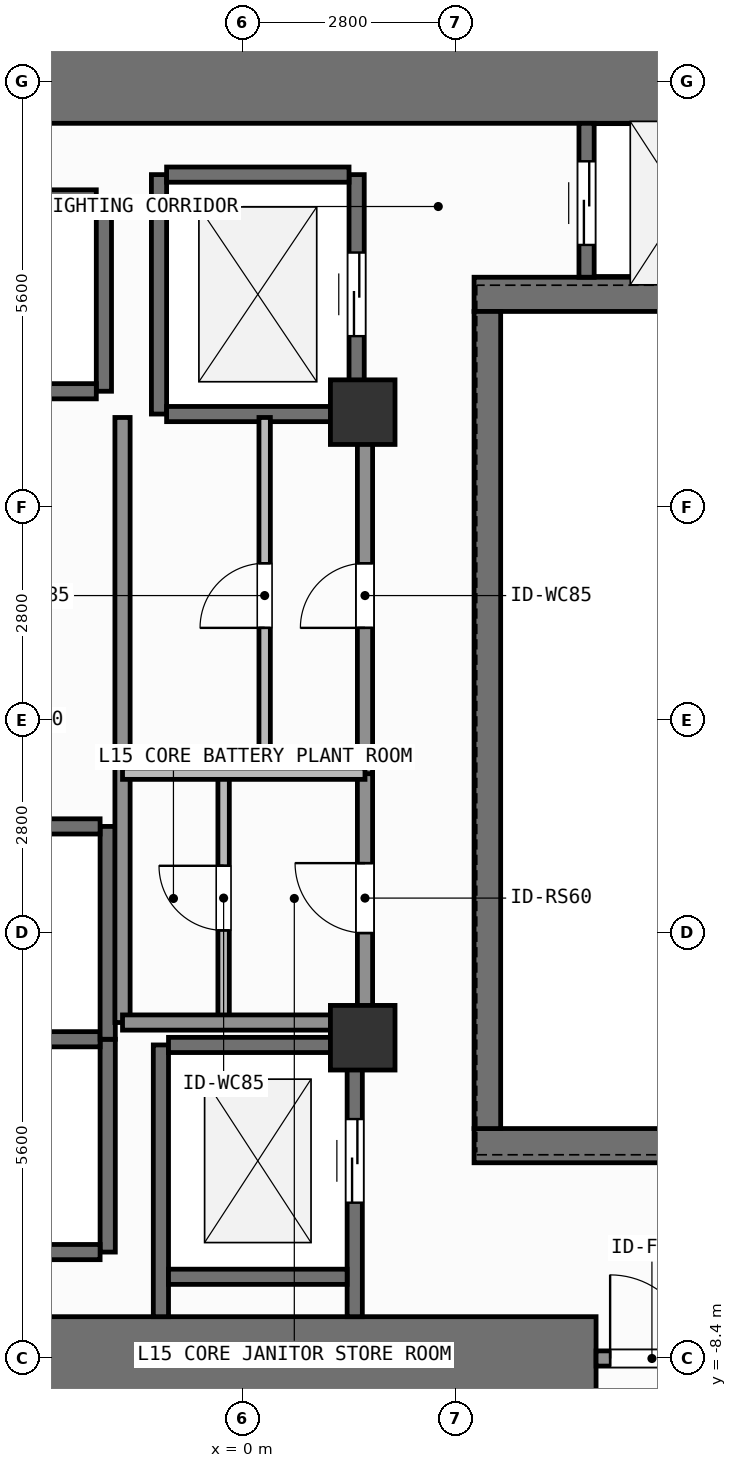
"""IFC4 building model, lengths in metres.
Left out: names, types, materials, properties, quantities, classifications, styles, units other than length and angle.
Written with IfcOpenShell. Run it as: python <this file> out.ifc"""

import sys

from ifc_helpers import new_model, si_unit, direction, frame, frame_2d, origin, origin_2d, place, context, subcontext, project, spatial, rectangle, extrude, element, fill, save


model = new_model("IFC4")
c1 = context("Model", 3, precision=1e-05, world=origin(), true_north=direction((0.0, 1.0)))
c2 = subcontext(c1, "Body", "Model", "MODEL_VIEW")
j1 = project(units=[si_unit("LENGTHUNIT", "METRE"), si_unit("PLANEANGLEUNIT", "RADIAN")], contexts=[c1])
p1 = place(None, origin())
s1 = spatial("IfcSite", under=j1, at=p1, CompositionType="ELEMENT")
p2 = place(p1, origin())
s2 = spatial("IfcBuilding", under=s1, at=p2, CompositionType="ELEMENT")
p3 = place(p2, frame((0.0, 0.0, 57.9)))
s3 = spatial("IfcBuildingStorey", under=s2, at=p3, CompositionType="ELEMENT", Elevation=57.9)
p4 = place(p3, frame((-2.62, -8.4, 0.0), z_axis=(0.0, 0.0, 1.0), x_axis=(1.0, 0.0, 0.0)))
e1 = element("IfcWall", 1, at=p4, inside=s3, PredefinedType="SHEAR", context=c2, shape_type="SweptSolid", body=[
    extrude(rectangle(XDim=7.27, YDim=1.1, at=frame_2d((3.635, 0.0))), origin(), (0.0, 0.0, 1.0), 3.9),
])
p5 = place(p3, frame((-7.55, 8.4, 0.0), z_axis=(0.0, 0.0, 1.0), x_axis=(1.0, 0.0, 0.0)))
e2 = element("IfcWall", 2, at=p5, inside=s3, PredefinedType="SHEAR", context=c2, shape_type="SweptSolid", body=[
    extrude(rectangle(XDim=16.5, YDim=1.1, at=frame_2d((8.25, 0.0))), origin(), (0.0, 0.0, 1.0), 3.9),
])
for number, where, z_axis, x_axis in (
    (3, (3.045, -5.6, 0.0), (0.0, 0.0, 1.0), (1.0, 0.0, 0.0)),
    (4, (3.045, 5.6, 0.0), (0.0, 0.0, 1.0), (1.0, 0.0, 0.0)),
):
    element("IfcWall", number, at=place(p3, frame(where, z_axis=z_axis, x_axis=x_axis)), inside=s3, PredefinedType="SHEAR", context=c2, shape_type="SweptSolid", body=[
        extrude(rectangle(XDim=5.905, YDim=0.45, at=frame_2d((2.953, 0.0))), origin(), (0.0, 0.0, 1.0), 3.9),
    ])
p6 = place(p3, frame((3.22, -5.375, 0.0), z_axis=(0.0, 0.0, 1.0), x_axis=(0.0, 1.0, 0.0)))
e5 = element("IfcWall", 5, at=p6, inside=s3, PredefinedType="SHEAR", context=c2, shape_type="SweptSolid", body=[
    extrude(rectangle(XDim=10.75, YDim=0.35, at=frame_2d((5.375, 0.0))), origin(), (0.0, 0.0, 1.0), 3.9),
])
for number, where, z_axis, x_axis in (
    (6, (1.58, -4.18, 0.0), (0.0, 0.0, 1.0), (1.0, 0.0, 0.0)),
    (7, (1.58, 4.05, 0.0), (0.0, 0.0, 1.0), (1.0, 0.0, 0.0)),
):
    element("IfcColumn", number, at=place(p3, frame(where, z_axis=z_axis, x_axis=x_axis)), inside=s3, PredefinedType="COLUMN", context=c2, shape_type="SweptSolid", body=[
        extrude(rectangle(XDim=0.85, YDim=0.85, at=origin_2d()), origin(), (0.0, 0.0, 1.0), 3.9),
    ])
p7 = place(p3, frame((-1.825, 4.325, 0.0), z_axis=(0.0, 0.0, 1.0), x_axis=(0.0, 1.0, 0.0)))
e8 = element("IfcWall", 8, at=p7, inside=s3, PredefinedType="SHEAR", context=c2, shape_type="SweptSolid", body=[
    extrude(rectangle(XDim=2.55, YDim=0.2, at=frame_2d((1.275, 0.0))), origin(), (0.0, 0.0, 1.0), 3.68),
])
for number, where, z_axis, x_axis in (
    (9, (-4.275, 4.325, 0.0), (0.0, 0.0, 1.0), (1.0, 0.0, 0.0)),
    (10, (-4.275, 6.875, 0.0), (0.0, 0.0, 1.0), (1.0, 0.0, 0.0)),
):
    element("IfcWall", number, at=place(p3, frame(where, z_axis=z_axis, x_axis=x_axis)), inside=s3, PredefinedType="SHEAR", context=c2, shape_type="SweptSolid", body=[
        extrude(rectangle(XDim=2.35, YDim=0.2, at=frame_2d((1.175, 0.0))), origin(), (0.0, 0.0, 1.0), 3.68),
    ])
p8 = place(p3, frame((-1.775, -7.0, 0.0), z_axis=(0.0, 0.0, 1.0), x_axis=(0.0, 1.0, 0.0)))
e11 = element("IfcWall", 11, at=p8, inside=s3, PredefinedType="SHEAR", context=c2, shape_type="SweptSolid", body=[
    extrude(rectangle(XDim=2.8, YDim=0.2, at=frame_2d((1.4, 0.0))), origin(), (0.0, 0.0, 1.0), 3.68),
])
for number, where, z_axis, x_axis in (
    (12, (-4.325, -7.0, 0.0), (0.0, 0.0, 1.0), (1.0, 0.0, 0.0)),
    (13, (-4.325, -4.2, 0.0), (0.0, 0.0, 1.0), (1.0, 0.0, 0.0)),
):
    element("IfcWall", number, at=place(p3, frame(where, z_axis=z_axis, x_axis=x_axis)), inside=s3, PredefinedType="SHEAR", context=c2, shape_type="SweptSolid", body=[
        extrude(rectangle(XDim=2.45, YDim=0.2, at=frame_2d((1.225, 0.0))), origin(), (0.0, 0.0, 1.0), 3.68),
    ])
p9 = place(p3, frame((-1.775, -4.2, 0.0), z_axis=(0.0, 0.0, 1.0), x_axis=(0.0, 1.0, 0.0)))
e14 = element("IfcWall", 14, at=p9, inside=s3, PredefinedType="SHEAR", context=c2, shape_type="SweptSolid", body=[
    extrude(rectangle(XDim=2.8, YDim=0.2, at=frame_2d((1.4, 0.0))), origin(), (0.0, 0.0, 1.0), 3.68),
])
p10 = place(p3, frame((-4.325, -1.4, 0.0), z_axis=(0.0, 0.0, 1.0), x_axis=(1.0, 0.0, 0.0)))
e15 = element("IfcWall", 15, at=p10, inside=s3, PredefinedType="SHEAR", context=c2, shape_type="SweptSolid", body=[
    extrude(rectangle(XDim=2.45, YDim=0.2, at=frame_2d((1.225, 0.0))), origin(), (0.0, 0.0, 1.0), 3.68),
])
p11 = place(p3, frame((-1.1, 4.025, 0.0), z_axis=(0.0, 0.0, 1.0), x_axis=(0.0, 1.0, 0.0)))
e16 = element("IfcWall", 16, at=p11, inside=s3, PredefinedType="SHEAR", context=c2, shape_type="SweptSolid", body=[
    extrude(rectangle(XDim=3.15, YDim=0.2, at=frame_2d((1.575, 0.0))), origin(), (0.0, 0.0, 1.0), 3.68),
])
p12 = place(p3, frame((1.5, 4.025, 0.0), z_axis=(0.0, 0.0, 1.0), x_axis=(0.0, 1.0, 0.0)))
e17 = element("IfcWall", 17, at=p12, inside=s3, PredefinedType="SHEAR", context=c2, shape_type="SweptSolid", body=[
    extrude(rectangle(XDim=3.15, YDim=0.2, at=frame_2d((1.575, 0.0))), origin(), (0.0, 0.0, 1.0), 3.68),
])
p13 = place(p12, frame((1.025, 0.0, 0.0)))
e18 = element("IfcOpeningElement", 18, at=p13, cuts=e17, PredefinedType="OPENING", context=c2, shape_type="SweptSolid", body=[
    extrude(rectangle(XDim=1.1, YDim=2.2, at=frame_2d((0.55, 1.1))), frame((0.0, 0.11, 0.0), z_axis=(0.0, -1.0, 0.0), x_axis=(1.0, 0.0, 0.0)), (0.0, 0.0, 1.0), 0.22),
])
for number, where, z_axis, x_axis in (
    (19, (-1.0, 4.025, 0.0), (0.0, 0.0, 1.0), (1.0, 0.0, 0.0)),
    (20, (-1.0, 7.175, 0.0), (0.0, 0.0, 1.0), (1.0, 0.0, 0.0)),
):
    element("IfcWall", number, at=place(p3, frame(where, z_axis=z_axis, x_axis=x_axis)), inside=s3, PredefinedType="SHEAR", context=c2, shape_type="SweptSolid", body=[
        extrude(rectangle(XDim=2.4, YDim=0.2, at=frame_2d((1.2, 0.0))), origin(), (0.0, 0.0, 1.0), 3.68),
    ])
p14 = place(p3, frame((-1.075, -7.85, 0.0), z_axis=(0.0, 0.0, 1.0), x_axis=(0.0, 1.0, 0.0)))
e21 = element("IfcWall", 21, at=p14, inside=s3, PredefinedType="SHEAR", context=c2, shape_type="SweptSolid", body=[
    extrude(rectangle(XDim=3.575, YDim=0.2, at=frame_2d((1.788, 0.0))), origin(), (0.0, 0.0, 1.0), 3.68),
])
p15 = place(p3, frame((1.475, -7.85, 0.0), z_axis=(0.0, 0.0, 1.0), x_axis=(0.0, 1.0, 0.0)))
e22 = element("IfcWall", 22, at=p15, inside=s3, PredefinedType="SHEAR", context=c2, shape_type="SweptSolid", body=[
    extrude(rectangle(XDim=3.575, YDim=0.2, at=frame_2d((1.788, 0.0))), origin(), (0.0, 0.0, 1.0), 3.68),
])
p16 = place(p15, frame((1.5, 0.0, 0.0)))
e23 = element("IfcOpeningElement", 23, at=p16, cuts=e22, PredefinedType="OPENING", context=c2, shape_type="SweptSolid", body=[
    extrude(rectangle(XDim=1.1, YDim=2.2, at=frame_2d((0.55, 1.1))), frame((0.0, 0.11, 0.0), z_axis=(0.0, -1.0, 0.0), x_axis=(1.0, 0.0, 0.0)), (0.0, 0.0, 1.0), 0.22),
])
for number, where, z_axis, x_axis in (
    (24, (-0.975, -7.325, 0.0), (0.0, 0.0, 1.0), (1.0, 0.0, 0.0)),
    (25, (-0.975, -4.275, 0.0), (0.0, 0.0, 1.0), (1.0, 0.0, 0.0)),
):
    element("IfcWall", number, at=place(p3, frame(where, z_axis=z_axis, x_axis=x_axis)), inside=s3, PredefinedType="SHEAR", context=c2, shape_type="SweptSolid", body=[
        extrude(rectangle(XDim=2.35, YDim=0.2, at=frame_2d((1.175, 0.0))), origin(), (0.0, 0.0, 1.0), 3.68),
    ])
p17 = place(p3, frame((4.525, 5.825, 0.0), z_axis=(0.0, 0.0, 1.0), x_axis=(0.0, 1.0, 0.0)))
e26 = element("IfcWall", 26, at=p17, inside=s3, PredefinedType="SHEAR", context=c2, shape_type="SweptSolid", body=[
    extrude(rectangle(XDim=2.025, YDim=0.2, at=frame_2d((1.013, 0.0))), origin(), (0.0, 0.0, 1.0), 3.68),
])
p18 = place(p17, frame((0.425, 0.0, 0.0)))
e27 = element("IfcOpeningElement", 27, at=p18, cuts=e26, PredefinedType="OPENING", context=c2, shape_type="SweptSolid", body=[
    extrude(rectangle(XDim=1.1, YDim=2.2, at=frame_2d((0.55, 1.1))), frame((0.0, 0.11, 0.0), z_axis=(0.0, -1.0, 0.0), x_axis=(1.0, 0.0, 0.0)), (0.0, 0.0, 1.0), 0.22),
])
p19 = place(p3, frame((4.65, -8.4, 0.0), z_axis=(0.0, 0.0, 1.0), x_axis=(1.0, 0.0, 0.0)))
e28 = element("IfcWall", 28, at=p19, inside=s3, PredefinedType="SOLIDWALL", context=c2, shape_type="SweptSolid", body=[
    extrude(rectangle(XDim=1.47, YDim=0.2, at=frame_2d((0.735, 0.0))), origin(), (0.0, 0.0, 1.0), 2.72),
])
p20 = place(p19, frame((0.185, 0.0, 0.0)))
e29 = element("IfcOpeningElement", 29, at=p20, cuts=e28, PredefinedType="OPENING", context=c2, shape_type="SweptSolid", body=[
    extrude(rectangle(XDim=1.1, YDim=2.15, at=frame_2d((0.55, 1.075))), frame((0.0, 0.11, 0.0), z_axis=(0.0, -1.0, 0.0), x_axis=(1.0, 0.0, 0.0)), (0.0, 0.0, 1.0), 0.22),
])
p21 = place(p3, frame((-0.25, -3.98, 0.0), z_axis=(0.0, 0.0, 1.0), x_axis=(0.0, 1.0, 0.0)))
e30 = element("IfcWall", 30, at=p21, inside=s3, PredefinedType="PARTITIONING", context=c2, shape_type="SweptSolid", body=[
    extrude(rectangle(XDim=3.274, YDim=0.15, at=frame_2d((1.637, 0.0))), origin(), (0.0, 0.0, 1.0), 3.68),
])
p22 = place(p21, frame((1.212, 0.0, 0.0)))
e31 = element("IfcOpeningElement", 31, at=p22, cuts=e30, PredefinedType="OPENING", context=c2, shape_type="SweptSolid", body=[
    extrude(rectangle(XDim=0.85, YDim=2.1, at=frame_2d((0.425, 1.05))), frame((0.0, 0.085, 0.0), z_axis=(0.0, -1.0, 0.0), x_axis=(1.0, 0.0, 0.0)), (0.0, 0.0, 1.0), 0.17),
])
p23 = place(p3, frame((0.29, -0.706, 0.0), z_axis=(0.0, 0.0, 1.0), x_axis=(0.0, 1.0, 0.0)))
e32 = element("IfcWall", 32, at=p23, inside=s3, PredefinedType="PARTITIONING", context=c2, shape_type="SweptSolid", body=[
    extrude(rectangle(XDim=4.686, YDim=0.15, at=frame_2d((2.343, 0.0))), origin(), (0.0, 0.0, 1.0), 3.68),
])
p24 = place(p23, frame((1.918, 0.0, 0.0)))
e33 = element("IfcOpeningElement", 33, at=p24, cuts=e32, PredefinedType="OPENING", context=c2, shape_type="SweptSolid", body=[
    extrude(rectangle(XDim=0.85, YDim=2.1, at=frame_2d((0.425, 1.05))), frame((0.0, 0.085, 0.0), z_axis=(0.0, -1.0, 0.0), x_axis=(1.0, 0.0, 0.0)), (0.0, 0.0, 1.0), 0.17),
])
p25 = place(p3, frame((1.61, -3.98, 0.0), z_axis=(0.0, 0.0, 1.0), x_axis=(0.0, 1.0, 0.0)))
e34 = element("IfcWall", 34, at=p25, inside=s3, PredefinedType="SOLIDWALL", context=c2, shape_type="SweptSolid", body=[
    extrude(rectangle(XDim=3.274, YDim=0.2, at=frame_2d((1.637, 0.0))), origin(), (0.0, 0.0, 1.0), 3.68),
])
p26 = place(p25, frame((1.177, 0.0, 0.0)))
e35 = element("IfcOpeningElement", 35, at=p26, cuts=e34, PredefinedType="OPENING", context=c2, shape_type="SweptSolid", body=[
    extrude(rectangle(XDim=0.92, YDim=2.1, at=frame_2d((0.46, 1.05))), frame((0.0, 0.11, 0.0), z_axis=(0.0, -1.0, 0.0), x_axis=(1.0, 0.0, 0.0)), (0.0, 0.0, 1.0), 0.22),
])
p27 = place(p3, frame((1.61, -0.706, 0.0), z_axis=(0.0, 0.0, 1.0), x_axis=(0.0, 1.0, 0.0)))
e36 = element("IfcWall", 36, at=p27, inside=s3, PredefinedType="SOLIDWALL", context=c2, shape_type="SweptSolid", body=[
    extrude(rectangle(XDim=4.686, YDim=0.2, at=frame_2d((2.343, 0.0))), origin(), (0.0, 0.0, 1.0), 3.68),
])
p28 = place(p27, frame((1.918, 0.0, 0.0)))
e37 = element("IfcOpeningElement", 37, at=p28, cuts=e36, PredefinedType="OPENING", context=c2, shape_type="SweptSolid", body=[
    extrude(rectangle(XDim=0.85, YDim=2.1, at=frame_2d((0.425, 1.05))), frame((0.0, 0.11, 0.0), z_axis=(0.0, -1.0, 0.0), x_axis=(1.0, 0.0, 0.0)), (0.0, 0.0, 1.0), 0.22),
])
p29 = place(p3, frame((-1.58, -3.98, 0.0), z_axis=(0.0, 0.0, 1.0), x_axis=(0.0, 1.0, 0.0)))
e38 = element("IfcWall", 38, at=p29, inside=s3, PredefinedType="SOLIDWALL", context=c2, shape_type="SweptSolid", body=[
    extrude(rectangle(XDim=7.96, YDim=0.2, at=frame_2d((3.98, 0.0))), origin(), (0.0, 0.0, 1.0), 3.68),
])
p30 = place(p3, frame((-1.58, -3.98, 0.0), z_axis=(0.0, 0.0, 1.0), x_axis=(1.0, 0.0, 0.0)))
e39 = element("IfcWall", 39, at=p30, inside=s3, PredefinedType="SOLIDWALL", context=c2, shape_type="SweptSolid", body=[
    extrude(rectangle(XDim=3.19, YDim=0.2, at=frame_2d((1.595, 0.0))), origin(), (0.0, 0.0, 1.0), 3.68),
])
p31 = place(p3, frame((-1.58, -0.706, 0.0), z_axis=(0.0, 0.0, 1.0), x_axis=(1.0, 0.0, 0.0)))
e40 = element("IfcWall", 40, at=p31, inside=s3, PredefinedType="PARTITIONING", context=c2, shape_type="SweptSolid", body=[
    extrude(rectangle(XDim=3.19, YDim=0.15, at=frame_2d((1.595, 0.0))), origin(), (0.0, 0.0, 1.0), 3.68),
])
p32 = place(p13, origin())
e41 = element("IfcDoor", 41, at=p32, inside=s3, OperationType="SLIDING_TO_LEFT", PredefinedType="DOOR", context=c2, shape_type="SweptSolid", body=[
    extrude(rectangle(XDim=1.1, YDim=2.2, at=frame_2d((0.55, 1.1))), frame((0.0, 0.025, 0.0), z_axis=(0.0, -1.0, 0.0), x_axis=(1.0, 0.0, 0.0)), (0.0, 0.0, 1.0), 0.05),
])
fill(e18, e41)
p33 = place(p16, origin())
e42 = element("IfcDoor", 42, at=p33, inside=s3, OperationType="SLIDING_TO_LEFT", PredefinedType="DOOR", context=c2, shape_type="SweptSolid", body=[
    extrude(rectangle(XDim=1.1, YDim=2.2, at=frame_2d((0.55, 1.1))), frame((0.0, 0.025, 0.0), z_axis=(0.0, -1.0, 0.0), x_axis=(1.0, 0.0, 0.0)), (0.0, 0.0, 1.0), 0.05),
])
fill(e23, e42)
p34 = place(p18, origin())
e43 = element("IfcDoor", 43, at=p34, inside=s3, OperationType="SLIDING_TO_LEFT", PredefinedType="DOOR", context=c2, shape_type="SweptSolid", body=[
    extrude(rectangle(XDim=1.1, YDim=2.2, at=frame_2d((0.55, 1.1))), frame((0.0, 0.025, 0.0), z_axis=(0.0, -1.0, 0.0), x_axis=(1.0, 0.0, 0.0)), (0.0, 0.0, 1.0), 0.05),
])
fill(e27, e43)
p35 = place(p20, origin())
e44 = element("IfcDoor", 44, at=p35, inside=s3, OperationType="SINGLE_SWING_LEFT", PredefinedType="DOOR", context=c2, shape_type="SweptSolid", body=[
    extrude(rectangle(XDim=1.1, YDim=2.15, at=frame_2d((0.55, 1.075))), frame((0.0, 0.025, 0.0), z_axis=(0.0, -1.0, 0.0), x_axis=(1.0, 0.0, 0.0)), (0.0, 0.0, 1.0), 0.05),
])
fill(e29, e44)
p36 = place(p22, origin())
e45 = element("IfcDoor", 45, at=p36, inside=s3, OperationType="SINGLE_SWING_RIGHT", PredefinedType="DOOR", context=c2, shape_type="SweptSolid", body=[
    extrude(rectangle(XDim=0.85, YDim=2.1, at=frame_2d((0.425, 1.05))), frame((0.0, 0.025, 0.0), z_axis=(0.0, -1.0, 0.0), x_axis=(1.0, 0.0, 0.0)), (0.0, 0.0, 1.0), 0.05),
])
fill(e31, e45)
p37 = place(p24, origin())
e46 = element("IfcDoor", 46, at=p37, inside=s3, OperationType="SINGLE_SWING_LEFT", PredefinedType="DOOR", context=c2, shape_type="SweptSolid", body=[
    extrude(rectangle(XDim=0.85, YDim=2.1, at=frame_2d((0.425, 1.05))), frame((0.0, 0.025, 0.0), z_axis=(0.0, -1.0, 0.0), x_axis=(1.0, 0.0, 0.0)), (0.0, 0.0, 1.0), 0.05),
])
fill(e33, e46)
p38 = place(p26, origin())
e47 = element("IfcDoor", 47, at=p38, inside=s3, OperationType="SINGLE_SWING_RIGHT", PredefinedType="DOOR", context=c2, shape_type="SweptSolid", body=[
    extrude(rectangle(XDim=0.92, YDim=2.1, at=frame_2d((0.46, 1.05))), frame((0.0, 0.025, 0.0), z_axis=(0.0, -1.0, 0.0), x_axis=(1.0, 0.0, 0.0)), (0.0, 0.0, 1.0), 0.05),
])
fill(e35, e47)
p39 = place(p28, origin())
e48 = element("IfcDoor", 48, at=p39, inside=s3, OperationType="SINGLE_SWING_LEFT", PredefinedType="DOOR", context=c2, shape_type="SweptSolid", body=[
    extrude(rectangle(XDim=0.85, YDim=2.1, at=frame_2d((0.425, 1.05))), frame((0.0, 0.025, 0.0), z_axis=(0.0, -1.0, 0.0), x_axis=(1.0, 0.0, 0.0)), (0.0, 0.0, 1.0), 0.05),
])
fill(e37, e48)
save(model, sys.argv[1])
